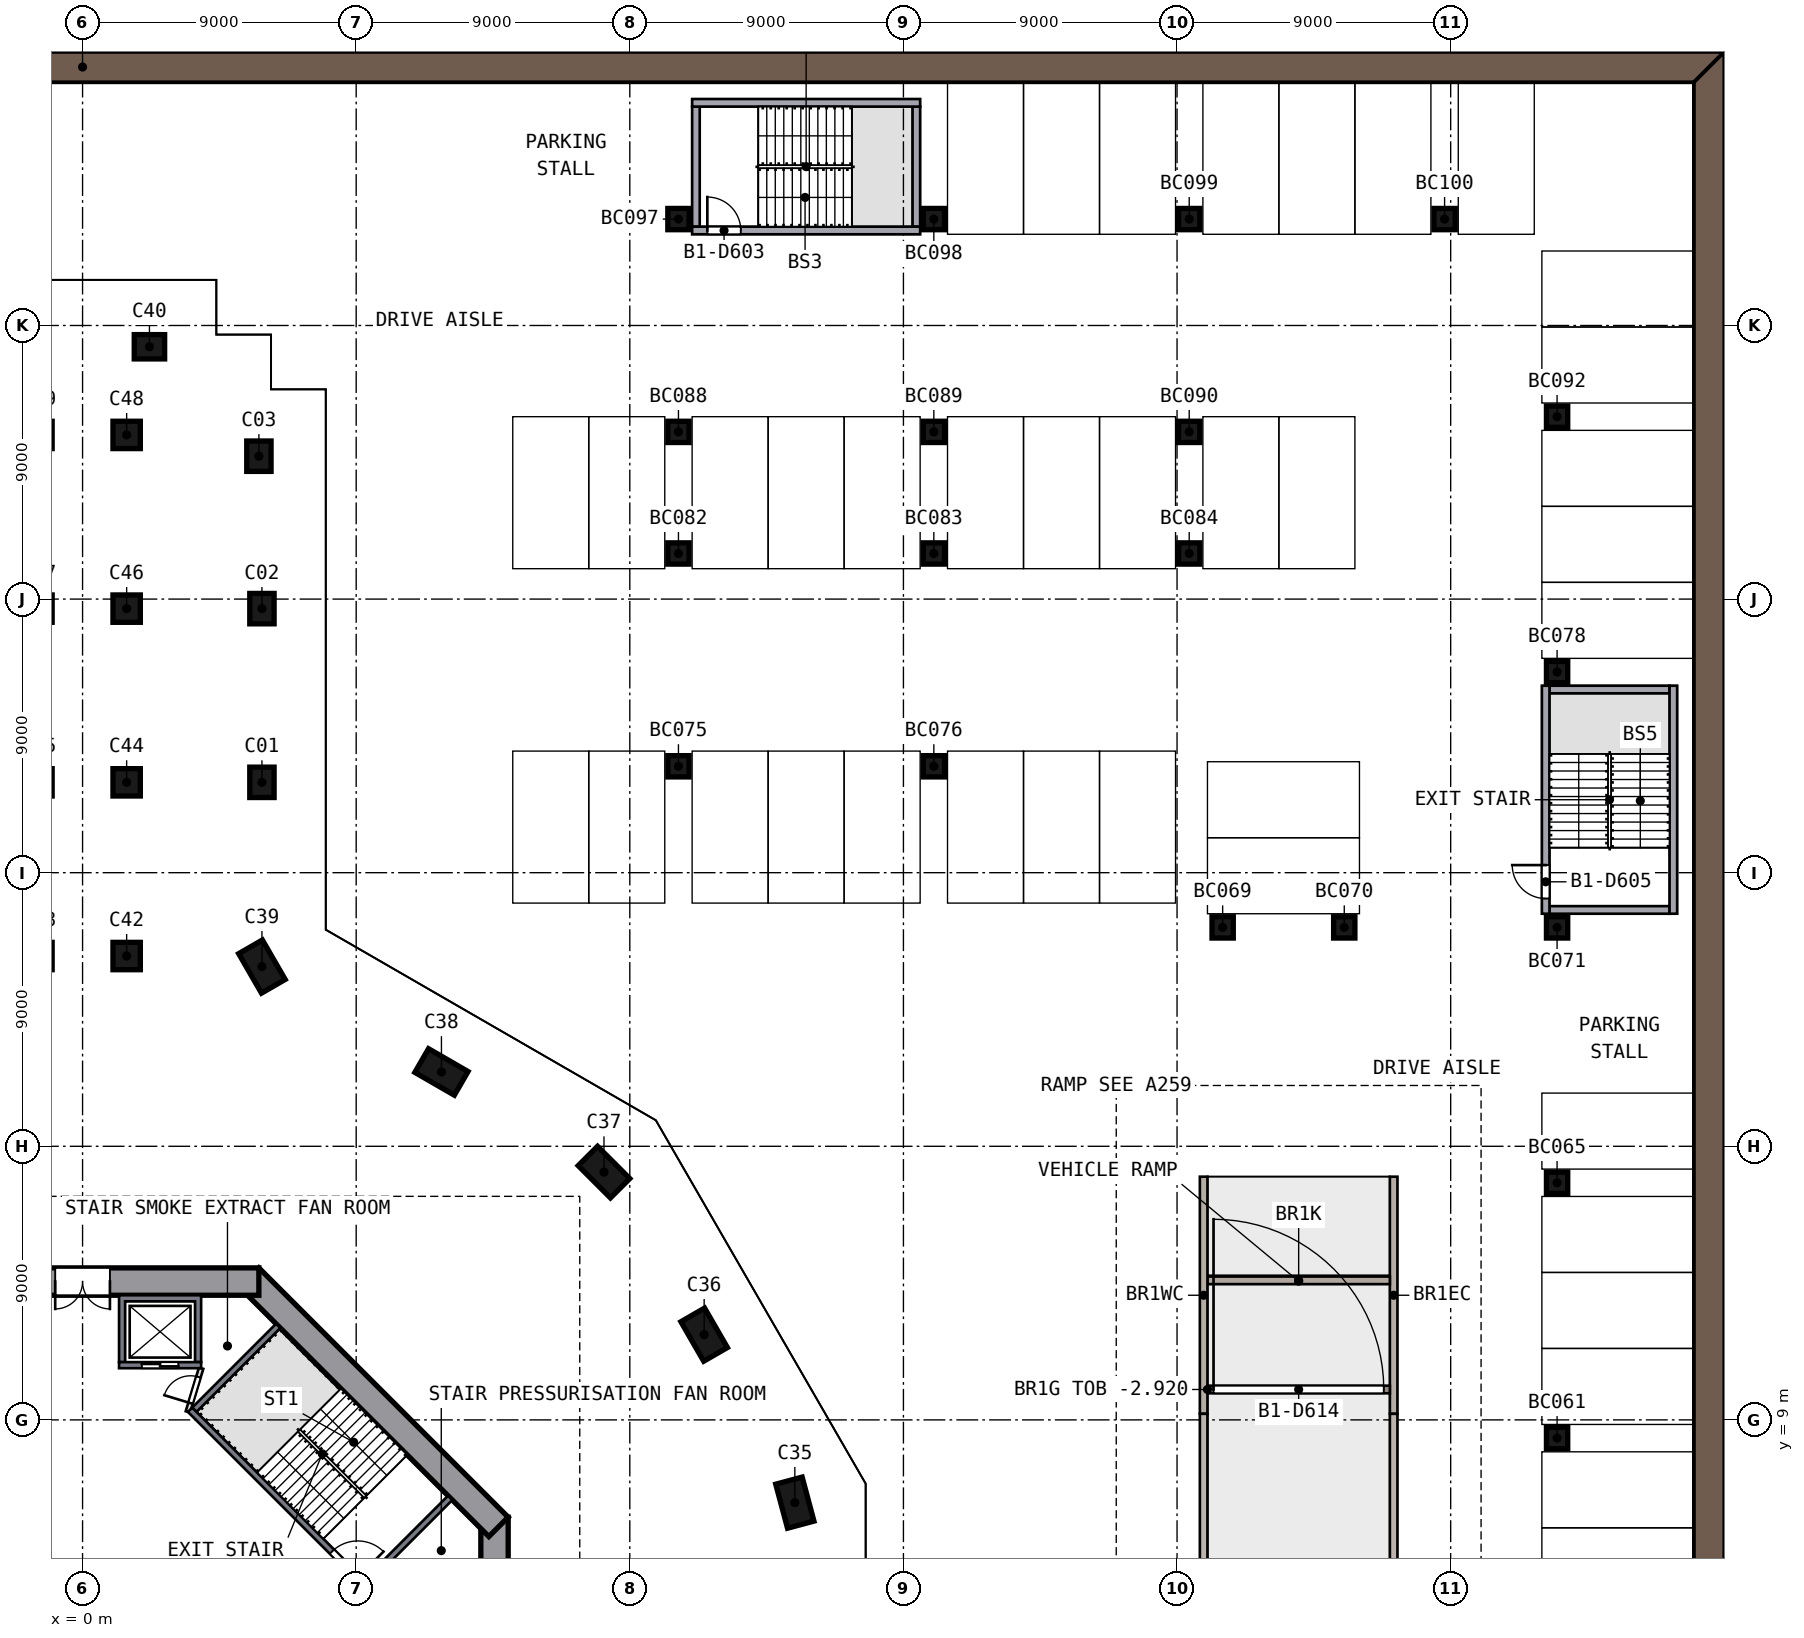
"""IFC4 building model, lengths in metres.
Left out: names, types, materials, properties, quantities, classifications, styles, units other than length and angle.
Written with IfcOpenShell. Run it as: python <this file> out.ifc"""

import sys

from ifc_helpers import new_model, si_unit, direction, frame, frame_2d, origin, origin_2d, place, context, subcontext, project, spatial, polyline, rectangle, outline, extrude, element, fill, save


model = new_model("IFC4")
c1 = context("Model", 3, precision=1e-05, world=origin(), true_north=direction((0.0, 1.0)))
c2 = subcontext(c1, "Body", "Model", "MODEL_VIEW")
j1 = project(units=[si_unit("LENGTHUNIT", "METRE"), si_unit("PLANEANGLEUNIT", "RADIAN")], contexts=[c1])
p1 = place(None, origin())
s1 = spatial("IfcSite", under=j1, at=p1, CompositionType="ELEMENT")
p2 = place(p1, origin())
s2 = spatial("IfcBuilding", under=s1, at=p2, CompositionType="ELEMENT")
p3 = place(p2, frame((0.0, 0.0, -3.9)))
s3 = spatial("IfcBuildingStorey", under=s2, at=p3, CompositionType="ELEMENT", Elevation=-3.9)
for number, where, z_axis, x_axis in (
    (1, (5.9, 29.972, 0.0), (0.0, 0.0, 1.0), (0.0, 1.0, 0.0)),
    (2, (5.9, 35.686, 0.0), (0.0, 0.0, 1.0), (0.0, 1.0, 0.0)),
    (3, (5.8, 40.7, 0.0), (0.0, 0.0, 1.0), (0.0, 1.0, 0.0)),
):
    element("IfcColumn", number, at=place(p3, frame(where, z_axis=z_axis, x_axis=x_axis)), inside=s3, PredefinedType="COLUMN", context=c2, shape_type="SweptSolid", body=[
        extrude(rectangle(XDim=1.0, YDim=0.8, at=origin_2d()), origin(), (0.0, 0.0, 1.0), 3.45),
    ])
for number, where, z_axis, x_axis in (
    (4, (23.428, 6.278, 0.0), (0.0, 0.0, 1.0), (0.259, -0.966, 0.0)),
    (5, (20.445, 11.804, 0.0), (0.0, 0.0, 1.0), (-0.5, 0.866, 0.0)),
    (6, (17.151, 17.151, 0.0), (0.0, 0.0, 1.0), (0.707, -0.707, 0.0)),
    (7, (11.804, 20.445, 0.0), (0.0, 0.0, 1.0), (-0.866, 0.5, 0.0)),
    (8, (5.9, 23.912, 0.0), (0.0, 0.0, 1.0), (0.5, -0.866, 0.0)),
):
    element("IfcColumn", number, at=place(p3, frame(where, z_axis=z_axis, x_axis=x_axis)), inside=s3, PredefinedType="COLUMN", context=c2, shape_type="SweptSolid", body=[
        extrude(rectangle(XDim=1.5, YDim=0.9, at=origin_2d()), origin(), (0.0, 0.0, 1.0), 3.45),
    ])
p4 = place(p3, frame((2.2, 44.3, 0.0), z_axis=(0.0, 0.0, 1.0), x_axis=(-1.0, 0.0, 0.0)))
e9 = element("IfcColumn", 9, at=p4, inside=s3, PredefinedType="COLUMN", context=c2, shape_type="SweptSolid", body=[
    extrude(rectangle(XDim=1.0, YDim=0.8, at=origin_2d()), origin(), (0.0, 0.0, 1.0), 3.45),
])
for number, where, z_axis, x_axis in (
    (10, (1.45, 24.258, 0.0), (0.0, 0.0, 1.0), (0.0, 1.0, 0.0)),
    (11, (1.45, 29.972, 0.0), (0.0, 0.0, 1.0), (0.0, 1.0, 0.0)),
    (12, (1.45, 35.686, 0.0), (0.0, 0.0, 1.0), (0.0, 1.0, 0.0)),
    (13, (1.45, 41.4, 0.0), (0.0, 0.0, 1.0), (0.0, 1.0, 0.0)),
):
    element("IfcColumn", number, at=place(p3, frame(where, z_axis=z_axis, x_axis=x_axis)), inside=s3, PredefinedType="COLUMN", context=c2, shape_type="SweptSolid", body=[
        extrude(rectangle(XDim=0.9, YDim=0.9, at=origin_2d()), origin(), (0.0, 0.0, 1.0), 3.45),
    ])
p5 = place(p3, frame((13.55, -5.799, 0.0), z_axis=(0.0, 0.0, 1.0), x_axis=(0.0, 1.0, 0.0)))
e14 = element("IfcWall", 14, at=p5, inside=s3, PredefinedType="SHEAR", context=c2, shape_type="SweptSolid", body=[
    extrude(rectangle(XDim=11.598, YDim=0.9, at=frame_2d((5.799, 0.0))), origin(), (0.0, 0.0, 1.0), 3.9),
])
p6 = place(p5, frame((4.899, 0.0, 0.0)))
e15 = element("IfcOpeningElement", 15, at=p6, cuts=e14, PredefinedType="OPENING", context=c2, shape_type="SweptSolid", body=[
    extrude(rectangle(XDim=1.8, YDim=2.1, at=frame_2d((0.9, 1.05))), frame((0.0, 0.46, 0.0), z_axis=(0.0, -1.0, 0.0), x_axis=(1.0, 0.0, 0.0)), (0.0, 0.0, 1.0), 0.92),
])
p7 = place(p3, frame((13.682, 5.481, 0.0), z_axis=(0.0, 0.0, 1.0), x_axis=(-0.707106781, 0.707106781, 0.0)))
e16 = element("IfcWall", 16, at=p7, inside=s3, PredefinedType="SHEAR", context=c2, shape_type="SweptSolid", body=[
    extrude(rectangle(XDim=11.598, YDim=0.9, at=frame_2d((5.799, 0.0))), origin(), (0.0, 0.0, 1.0), 3.9),
])
p8 = place(p3, frame((5.799, 13.55, 0.0), z_axis=(0.0, 0.0, 1.0), x_axis=(-1.0, 0.0, 0.0)))
e17 = element("IfcWall", 17, at=p8, inside=s3, PredefinedType="SHEAR", context=c2, shape_type="SweptSolid", body=[
    extrude(rectangle(XDim=11.598, YDim=0.9, at=frame_2d((5.799, 0.0))), origin(), (0.0, 0.0, 1.0), 3.9),
])
p9 = place(p8, frame((4.899, 0.0, 0.0)))
e18 = element("IfcOpeningElement", 18, at=p9, cuts=e17, PredefinedType="OPENING", context=c2, shape_type="SweptSolid", body=[
    extrude(rectangle(XDim=1.8, YDim=2.1, at=frame_2d((0.9, 1.05))), frame((0.0, 0.46, 0.0), z_axis=(0.0, -1.0, 0.0), x_axis=(1.0, 0.0, 0.0)), (0.0, 0.0, 1.0), 0.92),
])
p10 = place(p3, origin())
e19 = element("IfcWall", 19, at=p10, inside=s3, PredefinedType="SOLIDWALL", context=c2, shape_type="SweptSolid", body=[
    extrude(outline(polyline([(54.0, 54.0), (-54.0, 54.0), (-53.0, 53.0), (53.0, 53.0), (54.0, 54.0)])), origin(), (0.0, 0.0, 1.0), 3.9),
])
p11 = place(p3, origin())
e20 = element("IfcWall", 20, at=p11, inside=s3, PredefinedType="SOLIDWALL", context=c2, shape_type="SweptSolid", body=[
    extrude(outline(polyline([(54.0, -54.0), (54.0, 54.0), (53.0, 53.0), (53.0, -53.0), (54.0, -54.0)])), origin(), (0.0, 0.0, 1.0), 3.9),
])
for number, where, z_axis, x_axis in (
    (21, (48.5, 8.4, 0.0), (0.0, 0.0, 1.0), (1.0, 0.0, 0.0)),
    (22, (48.5, 16.8, 0.0), (0.0, 0.0, 1.0), (1.0, 0.0, 0.0)),
    (23, (37.5, 25.2, 0.0), (0.0, 0.0, 1.0), (1.0, 0.0, 0.0)),
    (24, (41.5, 25.2, 0.0), (0.0, 0.0, 1.0), (1.0, 0.0, 0.0)),
    (25, (48.5, 25.2, 0.0), (0.0, 0.0, 1.0), (1.0, 0.0, 0.0)),
    (26, (19.6, 30.5, 0.0), (0.0, 0.0, 1.0), (1.0, 0.0, 0.0)),
    (27, (28.0, 30.5, 0.0), (0.0, 0.0, 1.0), (1.0, 0.0, 0.0)),
    (28, (48.5, 33.6, 0.0), (0.0, 0.0, 1.0), (1.0, 0.0, 0.0)),
    (29, (19.6, 37.5, 0.0), (0.0, 0.0, 1.0), (1.0, 0.0, 0.0)),
    (30, (28.0, 37.5, 0.0), (0.0, 0.0, 1.0), (1.0, 0.0, 0.0)),
    (31, (36.4, 37.5, 0.0), (0.0, 0.0, 1.0), (1.0, 0.0, 0.0)),
    (32, (19.6, 41.5, 0.0), (0.0, 0.0, 1.0), (1.0, 0.0, 0.0)),
    (33, (28.0, 41.5, 0.0), (0.0, 0.0, 1.0), (1.0, 0.0, 0.0)),
    (34, (36.4, 41.5, 0.0), (0.0, 0.0, 1.0), (1.0, 0.0, 0.0)),
    (35, (48.5, 42.0, 0.0), (0.0, 0.0, 1.0), (1.0, 0.0, 0.0)),
    (36, (19.6, 48.5, 0.0), (0.0, 0.0, 1.0), (1.0, 0.0, 0.0)),
    (37, (28.0, 48.5, 0.0), (0.0, 0.0, 1.0), (1.0, 0.0, 0.0)),
    (38, (36.4, 48.5, 0.0), (0.0, 0.0, 1.0), (1.0, 0.0, 0.0)),
    (39, (44.8, 48.5, 0.0), (0.0, 0.0, 1.0), (1.0, 0.0, 0.0)),
):
    element("IfcColumn", number, at=place(p3, frame(where, z_axis=z_axis, x_axis=x_axis)), inside=s3, PredefinedType="COLUMN", context=c2, shape_type="SweptSolid", body=[
        extrude(rectangle(XDim=0.7, YDim=0.7, at=origin_2d()), origin(), (0.0, 0.0, 1.0), 3.84),
    ])
for number, where, z_axis, x_axis in (
    (40, (36.875, -9.5, 0.0), (0.0, 0.0, 1.0), (0.0, 1.0, 0.0)),
    (41, (43.125, -9.5, 0.0), (0.0, 0.0, 1.0), (0.0, 1.0, 0.0)),
):
    element("IfcWall", number, at=place(p3, frame(where, z_axis=z_axis, x_axis=x_axis)), inside=s3, PredefinedType="SOLIDWALL", context=c2, shape_type="SweptSolid", body=[
        extrude(rectangle(XDim=18.7, YDim=0.25, at=frame_2d((9.35, 0.0))), origin(), (0.0, 0.0, 1.0), 3.9),
    ])
for number, where, z_axis, x_axis in (
    (42, (36.875, 9.2, 0.0), (0.0, 0.0, 1.0), (0.0, 1.0, 0.0)),
    (43, (43.125, 9.2, 0.0), (0.0, 0.0, 1.0), (0.0, 1.0, 0.0)),
):
    element("IfcWall", number, at=place(p3, frame(where, z_axis=z_axis, x_axis=x_axis)), inside=s3, PredefinedType="SOLIDWALL", context=c2, shape_type="SweptSolid", body=[
        extrude(rectangle(XDim=7.8, YDim=0.25, at=frame_2d((3.9, 0.0))), origin(), (0.0, 0.0, 1.0), 3.3),
    ])
p12 = place(p3, frame((37.0, 13.591, 0.0), z_axis=(0.0, 0.0, 1.0), x_axis=(1.0, 0.0, 0.0)))
e44 = element("IfcWall", 44, at=p12, inside=s3, PredefinedType="SOLIDWALL", context=c2, shape_type="SweptSolid", body=[
    extrude(rectangle(XDim=6.0, YDim=0.25, at=frame_2d((3.0, 0.0))), origin(), (0.0, 0.0, 1.0), 0.395),
])
p13 = place(p3, frame((37.0, 10.0, 0.979), z_axis=(0.0, 0.0, 1.0), x_axis=(1.0, 0.0, 0.0)))
e45 = element("IfcWall", 45, at=p13, inside=s3, PredefinedType="PARTITIONING", context=c2, shape_type="SweptSolid", body=[
    extrude(rectangle(XDim=6.0, YDim=0.25, at=frame_2d((3.0, 0.0))), origin(), (0.0, 0.0, 1.0), 2.32),
])
p14 = place(p13, frame((0.2, 0.0, 0.0)))
e46 = element("IfcOpeningElement", 46, at=p14, cuts=e45, PredefinedType="OPENING", context=c2, shape_type="SweptSolid", body=[
    extrude(rectangle(XDim=5.6, YDim=2.2, at=frame_2d((2.8, 1.1))), frame((0.0, 0.135, 0.0), z_axis=(0.0, -1.0, 0.0), x_axis=(1.0, 0.0, 0.0)), (0.0, 0.0, 1.0), 0.27),
])
p15 = place(p3, origin())
e47 = element("IfcWall", 47, at=p15, inside=s3, PredefinedType="SOLIDWALL", context=c2, shape_type="SweptSolid", body=[
    extrude(outline(polyline([(3.9, 13.1), (3.9, 10.9), (3.7, 10.9), (3.7, 12.9), (1.4, 12.9), (1.4, 10.9), (1.2, 10.9), (1.2, 13.1), (3.9, 13.1)])), origin(), (0.0, 0.0, 1.0), 3.45),
])
p16 = place(p3, frame((1.2, 10.8, 0.0), z_axis=(0.0, 0.0, 1.0), x_axis=(1.0, 0.0, 0.0)))
e48 = element("IfcWall", 48, at=p16, inside=s3, PredefinedType="SOLIDWALL", context=c2, shape_type="SweptSolid", body=[
    extrude(rectangle(XDim=2.7, YDim=0.2, at=frame_2d((1.35, 0.0))), origin(), (0.0, 0.0, 1.0), 3.45),
])
p17 = place(p16, frame((0.75, 0.0, 0.0)))
e49 = element("IfcOpeningElement", 49, at=p17, cuts=e48, PredefinedType="OPENING", context=c2, shape_type="SweptSolid", body=[
    extrude(rectangle(XDim=1.2, YDim=2.1, at=frame_2d((0.6, 1.05))), frame((0.0, 0.11, 0.0), z_axis=(0.0, -1.0, 0.0), x_axis=(1.0, 0.0, 0.0)), (0.0, 0.0, 1.0), 0.22),
])
p18 = place(p3, frame((3.535, 9.334, 0.0), z_axis=(0.0, 0.0, 1.0), x_axis=(0.707106781, -0.707106781, 0.0)))
e50 = element("IfcWall", 50, at=p18, inside=s3, PredefinedType="SOLIDWALL", context=c2, shape_type="SweptSolid", body=[
    extrude(rectangle(XDim=8.2, YDim=0.2, at=frame_2d((4.1, 0.0))), origin(), (0.0, 0.0, 1.0), 3.45),
])
p19 = place(p18, frame((6.6, 0.0, 0.0)))
e51 = element("IfcOpeningElement", 51, at=p19, cuts=e50, PredefinedType="OPENING", context=c2, shape_type="SweptSolid", body=[
    extrude(rectangle(XDim=1.2, YDim=2.1, at=frame_2d((0.6, 1.05))), frame((0.0, 0.11, 0.0), z_axis=(0.0, -1.0, 0.0), x_axis=(1.0, 0.0, 0.0)), (0.0, 0.0, 1.0), 0.22),
])
for number, where, z_axis, x_axis in (
    (52, (9.334, 3.677, 0.0), (0.0, 0.0, 1.0), (0.707, 0.707, 0.0)),
    (53, (3.677, 9.334, 0.0), (0.0, 0.0, 1.0), (0.707, 0.707, 0.0)),
):
    element("IfcWall", number, at=place(p3, frame(where, z_axis=z_axis, x_axis=x_axis)), inside=s3, PredefinedType="SOLIDWALL", context=c2, shape_type="SweptSolid", body=[
        extrude(rectangle(XDim=3.9, YDim=0.2, at=frame_2d((1.95, 0.0))), origin(), (0.0, 0.0, 1.0), 3.45),
    ])
p20 = place(p3, frame((3.465, 9.263, 0.0), z_axis=(0.0, 0.0, 1.0), x_axis=(0.289808785, 0.957084567, 0.0)))
e54 = element("IfcWall", 54, at=p20, inside=s3, PredefinedType="PARTITIONING", context=c2, shape_type="SweptSolid", body=[
    extrude(rectangle(XDim=1.501, YDim=0.15, at=frame_2d((0.75, 0.0))), origin(), (0.0, 0.0, 1.0), 3.45),
])
p21 = place(p20, frame((0.301, 0.0, 0.0)))
e55 = element("IfcOpeningElement", 55, at=p21, cuts=e54, PredefinedType="OPENING", context=c2, shape_type="SweptSolid", body=[
    extrude(rectangle(XDim=0.9, YDim=2.1, at=frame_2d((0.45, 1.05))), frame((0.0, 0.085, 0.0), z_axis=(0.0, -1.0, 0.0), x_axis=(1.0, 0.0, 0.0)), (0.0, 0.0, 1.0), 0.17),
])
p22 = place(p3, frame((20.05, 52.325, 0.0), z_axis=(0.0, 0.0, 1.0), x_axis=(1.0, 0.0, 0.0)))
e56 = element("IfcWall", 56, at=p22, inside=s3, PredefinedType="SOLIDWALL", context=c2, shape_type="SweptSolid", body=[
    extrude(rectangle(XDim=7.5, YDim=0.25, at=frame_2d((3.75, 0.0))), origin(), (0.0, 0.0, 1.0), 3.9),
])
p23 = place(p3, frame((20.05, 48.125, 0.0), z_axis=(0.0, 0.0, 1.0), x_axis=(1.0, 0.0, 0.0)))
e57 = element("IfcWall", 57, at=p23, inside=s3, PredefinedType="SOLIDWALL", context=c2, shape_type="SweptSolid", body=[
    extrude(rectangle(XDim=7.5, YDim=0.25, at=frame_2d((3.75, 0.0))), origin(), (0.0, 0.0, 1.0), 3.9),
])
p24 = place(p23, frame((0.5, 0.0, 0.0)))
e58 = element("IfcOpeningElement", 58, at=p24, cuts=e57, PredefinedType="OPENING", context=c2, shape_type="SweptSolid", body=[
    extrude(rectangle(XDim=1.1, YDim=2.1, at=frame_2d((0.55, 1.05))), frame((0.0, 0.135, 0.0), z_axis=(0.0, -1.0, 0.0), x_axis=(1.0, 0.0, 0.0)), (0.0, 0.0, 1.0), 0.27),
])
for number, where, z_axis, x_axis in (
    (59, (20.175, 48.25, 0.0), (0.0, 0.0, 1.0), (0.0, 1.0, 0.0)),
    (60, (27.425, 48.25, 0.0), (0.0, 0.0, 1.0), (0.0, 1.0, 0.0)),
):
    element("IfcWall", number, at=place(p3, frame(where, z_axis=z_axis, x_axis=x_axis)), inside=s3, PredefinedType="SOLIDWALL", context=c2, shape_type="SweptSolid", body=[
        extrude(rectangle(XDim=3.95, YDim=0.25, at=frame_2d((1.975, 0.0))), origin(), (0.0, 0.0, 1.0), 3.9),
    ])
p25 = place(p3, frame((48.125, 25.65, 0.0), z_axis=(0.0, 0.0, 1.0), x_axis=(0.0, 1.0, 0.0)))
e61 = element("IfcWall", 61, at=p25, inside=s3, PredefinedType="SOLIDWALL", context=c2, shape_type="SweptSolid", body=[
    extrude(rectangle(XDim=7.5, YDim=0.25, at=frame_2d((3.75, 0.0))), origin(), (0.0, 0.0, 1.0), 3.9),
])
p26 = place(p25, frame((0.5, 0.0, 0.0)))
e62 = element("IfcOpeningElement", 62, at=p26, cuts=e61, PredefinedType="OPENING", context=c2, shape_type="SweptSolid", body=[
    extrude(rectangle(XDim=1.1, YDim=2.1, at=frame_2d((0.55, 1.05))), frame((0.0, 0.135, 0.0), z_axis=(0.0, -1.0, 0.0), x_axis=(1.0, 0.0, 0.0)), (0.0, 0.0, 1.0), 0.27),
])
p27 = place(p3, frame((52.325, 25.65, 0.0), z_axis=(0.0, 0.0, 1.0), x_axis=(0.0, 1.0, 0.0)))
e63 = element("IfcWall", 63, at=p27, inside=s3, PredefinedType="SOLIDWALL", context=c2, shape_type="SweptSolid", body=[
    extrude(rectangle(XDim=7.5, YDim=0.25, at=frame_2d((3.75, 0.0))), origin(), (0.0, 0.0, 1.0), 3.9),
])
for number, where, z_axis, x_axis in (
    (64, (52.2, 25.775, 0.0), (0.0, 0.0, 1.0), (-1.0, 0.0, 0.0)),
    (65, (52.2, 33.025, 0.0), (0.0, 0.0, 1.0), (-1.0, 0.0, 0.0)),
):
    element("IfcWall", number, at=place(p3, frame(where, z_axis=z_axis, x_axis=x_axis)), inside=s3, PredefinedType="SOLIDWALL", context=c2, shape_type="SweptSolid", body=[
        extrude(rectangle(XDim=3.95, YDim=0.25, at=frame_2d((1.975, 0.0))), origin(), (0.0, 0.0, 1.0), 3.9),
    ])
p28 = place(p17, origin())
e66 = element("IfcDoor", 66, at=p28, inside=s3, OperationType="DOUBLE_DOOR_SLIDING", PredefinedType="DOOR", context=c2, shape_type="SweptSolid", body=[
    extrude(rectangle(XDim=1.2, YDim=2.1, at=frame_2d((0.6, 1.05))), frame((0.0, 0.025, 0.0), z_axis=(0.0, -1.0, 0.0), x_axis=(1.0, 0.0, 0.0)), (0.0, 0.0, 1.0), 0.05),
])
fill(e49, e66)
p29 = place(p19, origin())
e67 = element("IfcDoor", 67, at=p29, inside=s3, OperationType="SINGLE_SWING_RIGHT", PredefinedType="DOOR", context=c2, shape_type="SweptSolid", body=[
    extrude(rectangle(XDim=1.2, YDim=2.1, at=frame_2d((0.6, 1.05))), frame((0.0, 0.025, 0.0), z_axis=(0.0, -1.0, 0.0), x_axis=(1.0, 0.0, 0.0)), (0.0, 0.0, 1.0), 0.05),
])
fill(e51, e67)
p30 = place(p9, origin())
e68 = element("IfcDoor", 68, at=p30, inside=s3, OperationType="DOUBLE_DOOR_SINGLE_SWING", PredefinedType="DOOR", context=c2, shape_type="SweptSolid", body=[
    extrude(rectangle(XDim=1.8, YDim=2.1, at=frame_2d((0.9, 1.05))), frame((0.0, 0.025, 0.0), z_axis=(0.0, -1.0, 0.0), x_axis=(1.0, 0.0, 0.0)), (0.0, 0.0, 1.0), 0.05),
])
fill(e18, e68)
p31 = place(p21, origin())
e69 = element("IfcDoor", 69, at=p31, inside=s3, OperationType="SINGLE_SWING_LEFT", PredefinedType="DOOR", context=c2, shape_type="SweptSolid", body=[
    extrude(rectangle(XDim=0.9, YDim=2.1, at=frame_2d((0.45, 1.05))), frame((0.0, 0.025, 0.0), z_axis=(0.0, -1.0, 0.0), x_axis=(1.0, 0.0, 0.0)), (0.0, 0.0, 1.0), 0.05),
])
fill(e55, e69)
p32 = place(p24, origin())
e70 = element("IfcDoor", 70, at=p32, inside=s3, OperationType="SINGLE_SWING_LEFT", PredefinedType="DOOR", context=c2, shape_type="SweptSolid", body=[
    extrude(rectangle(XDim=1.1, YDim=2.1, at=frame_2d((0.55, 1.05))), frame((0.0, 0.025, 0.0), z_axis=(0.0, -1.0, 0.0), x_axis=(1.0, 0.0, 0.0)), (0.0, 0.0, 1.0), 0.05),
])
fill(e58, e70)
p33 = place(p26, origin())
e71 = element("IfcDoor", 71, at=p33, inside=s3, OperationType="SINGLE_SWING_RIGHT", PredefinedType="DOOR", context=c2, shape_type="SweptSolid", body=[
    extrude(rectangle(XDim=1.1, YDim=2.1, at=frame_2d((0.55, 1.05))), frame((0.0, 0.025, 0.0), z_axis=(0.0, -1.0, 0.0), x_axis=(1.0, 0.0, 0.0)), (0.0, 0.0, 1.0), 0.05),
])
fill(e62, e71)
p34 = place(p14, origin())
e72 = element("IfcDoor", 72, at=p34, inside=s3, OperationType="ROLLINGUP", PredefinedType="DOOR", context=c2, shape_type="SweptSolid", body=[
    extrude(rectangle(XDim=5.6, YDim=2.2, at=frame_2d((2.8, 1.1))), frame((0.0, 0.025, 0.0), z_axis=(0.0, -1.0, 0.0), x_axis=(1.0, 0.0, 0.0)), (0.0, 0.0, 1.0), 0.05),
])
fill(e46, e72)
save(model, sys.argv[1])
